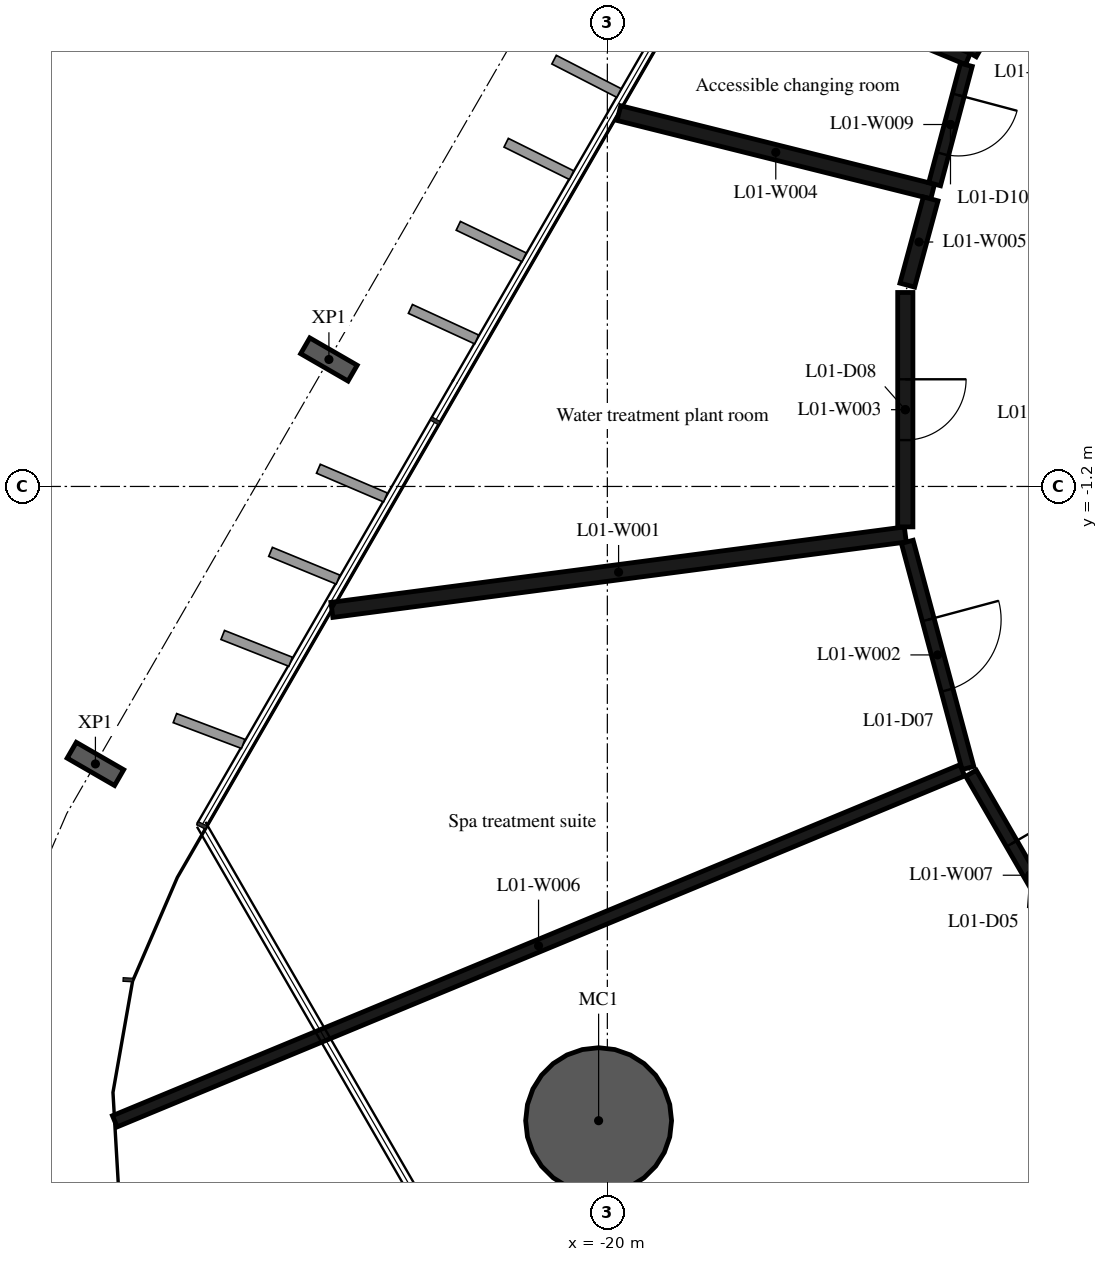
"""IFC4 building model, lengths in metres.
Left out: names, types, materials, properties, quantities, classifications, styles, units other than length and angle.
Written with IfcOpenShell. Run it as: python <this file> out.ifc"""

import sys

from ifc_helpers import new_model, si_unit, direction, frame, frame_2d, origin, origin_2d, place, context, subcontext, project, spatial, rectangle, hollow_circle, i_section, extrude, element, fill, save


model = new_model("IFC4")
c1 = context("Model", 3, precision=1e-05, world=origin(), true_north=direction((0.0, 1.0)))
c2 = subcontext(c1, "Body", "Model", "MODEL_VIEW")
j1 = project(units=[si_unit("LENGTHUNIT", "METRE"), si_unit("PLANEANGLEUNIT", "RADIAN")], contexts=[c1])
p1 = place(None, origin())
s1 = spatial("IfcSite", under=j1, at=p1, CompositionType="ELEMENT")
p2 = place(p1, origin())
s2 = spatial("IfcBuilding", under=s1, at=p2, CompositionType="ELEMENT")
p3 = place(p2, frame((0.0, 0.0, 9.0)))
s3 = spatial("IfcBuildingStorey", under=s2, at=p3, CompositionType="ELEMENT", Elevation=9.0)
p4 = place(p3, frame((-20.144, -11.63, -0.38), z_axis=(0.0, 0.0, 1.0), x_axis=(1.0, 0.0, 0.0)))
e1 = element("IfcColumn", 1, at=p4, inside=s3, PredefinedType="COLUMN", context=c2, shape_type="SweptSolid", body=[
    extrude(hollow_circle(Radius=1.2, WallThickness=0.06, at=origin_2d()), origin(), (0.0, 0.0, 1.0), 4.8),
])
for number, where, z_axis, x_axis in (
    (2, (-24.579, 0.888, -0.38), (0.0, 0.0, 1.0), (0.5, 0.866, 0.0)),
    (3, (-28.419, -5.763, -0.38), (0.0, 0.0, 1.0), (0.5, 0.866, 0.0)),
):
    element("IfcColumn", number, at=place(p3, frame(where, z_axis=z_axis, x_axis=x_axis)), inside=s3, PredefinedType="COLUMN", context=c2, shape_type="SweptSolid", body=[
        extrude(i_section(OverallWidth=0.3, OverallDepth=0.9, WebThickness=0.019, FlangeThickness=0.035, FilletRadius=0.03, at=origin_2d()), origin(), (0.0, 0.0, 1.0), 4.8),
    ])
p5 = place(p3, frame((-15.1, -1.99, 0.0), z_axis=(0.0, 0.0, 1.0), x_axis=(-0.99146503856, -0.130372839634, 0.0)))
e4 = element("IfcWall", 4, at=p5, inside=s3, PredefinedType="PARTITIONING", context=c2, shape_type="SweptSolid", body=[
    extrude(rectangle(XDim=9.511, YDim=0.25, at=frame_2d((4.756, 0.0))), origin(), (0.0, 0.0, 1.0), 4.42),
])
p6 = place(p3, frame((-15.068, -2.111, 0.0), z_axis=(0.0, 0.0, 1.0), x_axis=(0.259059323171, -0.965861411942, 0.0)))
e5 = element("IfcWall", 5, at=p6, inside=s3, PredefinedType="PARTITIONING", context=c2, shape_type="SweptSolid", body=[
    extrude(rectangle(XDim=3.851, YDim=0.2, at=frame_2d((1.925, 0.0))), origin(), (0.0, 0.0, 1.0), 4.42),
])
p7 = place(p6, frame((1.325, 0.0, 0.0)))
e6 = element("IfcOpeningElement", 6, at=p7, cuts=e5, PredefinedType="OPENING", context=c2, shape_type="SweptSolid", body=[
    extrude(rectangle(XDim=1.2, YDim=2.1, at=frame_2d((0.6, 1.05))), frame((0.0, 0.11, 0.0), z_axis=(0.0, -1.0, 0.0), x_axis=(1.0, 0.0, 0.0)), (0.0, 0.0, 1.0), 0.22),
])
p8 = place(p3, frame((-15.1, 1.99, 0.0), z_axis=(0.0, 0.0, 1.0), x_axis=(0.0, -1.0, 0.0)))
e7 = element("IfcWall", 7, at=p8, inside=s3, PredefinedType="PARTITIONING", context=c2, shape_type="SweptSolid", body=[
    extrude(rectangle(XDim=3.855, YDim=0.25, at=frame_2d((1.927, 0.0))), origin(), (0.0, 0.0, 1.0), 4.42),
])
p9 = place(p8, frame((1.427, 0.0, 0.0)))
e8 = element("IfcOpeningElement", 8, at=p9, cuts=e7, PredefinedType="OPENING", context=c2, shape_type="SweptSolid", body=[
    extrude(rectangle(XDim=1.0, YDim=2.1, at=frame_2d((0.5, 1.05))), frame((0.0, 0.135, 0.0), z_axis=(0.0, -1.0, 0.0), x_axis=(1.0, 0.0, 0.0)), (0.0, 0.0, 1.0), 0.27),
])
p10 = place(p3, frame((-14.65, 3.65, 0.0), z_axis=(0.0, 0.0, 1.0), x_axis=(-0.970142500145, 0.242535625036, 0.0)))
e9 = element("IfcWall", 9, at=p10, inside=s3, PredefinedType="PARTITIONING", context=c2, shape_type="SweptSolid", body=[
    extrude(rectangle(XDim=5.319, YDim=0.25, at=frame_2d((2.659, 0.0))), origin(), (0.0, 0.0, 1.0), 4.42),
])
p11 = place(p3, frame((-14.683, 3.529, 0.0), z_axis=(0.0, 0.0, 1.0), x_axis=(-0.261753947787, -0.9651346387, 0.0)))
e10 = element("IfcWall", 10, at=p11, inside=s3, PredefinedType="PARTITIONING", context=c2, shape_type="SweptSolid", body=[
    extrude(rectangle(XDim=1.47, YDim=0.25, at=frame_2d((0.735, 0.0))), origin(), (0.0, 0.0, 1.0), 4.42),
])
p12 = place(p3, frame((-14.162, -5.868, 0.0), z_axis=(0.0, 0.0, 1.0), x_axis=(-0.923914077449, -0.382600022859, 0.0)))
e11 = element("IfcWall", 11, at=p12, inside=s3, PredefinedType="PARTITIONING", context=c2, shape_type="SweptSolid", body=[
    extrude(rectangle(XDim=15.085, YDim=0.2, at=frame_2d((7.543, 0.0))), origin(), (0.0, 0.0, 1.0), 4.42),
])
p13 = place(p3, frame((-14.02, -5.917, 0.0), z_axis=(0.0, 0.0, 1.0), x_axis=(0.500733182901, -0.865601686425, 0.0)))
e12 = element("IfcWall", 12, at=p13, inside=s3, PredefinedType="PARTITIONING", context=c2, shape_type="SweptSolid", body=[
    extrude(rectangle(XDim=3.874, YDim=0.2, at=frame_2d((1.937, 0.0))), origin(), (0.0, 0.0, 1.0), 4.42),
])
p14 = place(p13, frame((1.337, 0.0, 0.0)))
e13 = element("IfcOpeningElement", 13, at=p14, cuts=e12, PredefinedType="OPENING", context=c2, shape_type="SweptSolid", body=[
    extrude(rectangle(XDim=1.2, YDim=2.1, at=frame_2d((0.6, 1.05))), frame((0.0, 0.11, 0.0), z_axis=(0.0, -1.0, 0.0), x_axis=(1.0, 0.0, 0.0)), (0.0, 0.0, 1.0), 0.22),
])
p15 = place(p3, frame((-14.07, 5.83, 0.0), z_axis=(0.0, 0.0, 1.0), x_axis=(-0.923722282312, 0.383062847533, 0.0)))
e14 = element("IfcWall", 14, at=p15, inside=s3, PredefinedType="PARTITIONING", context=c2, shape_type="SweptSolid", body=[
    extrude(rectangle(XDim=4.568, YDim=0.2, at=frame_2d((2.284, 0.0))), origin(), (0.0, 0.0, 1.0), 4.42),
])
p16 = place(p3, frame((-14.096, 5.733, 0.0), z_axis=(0.0, 0.0, 1.0), x_axis=(-0.257131388612, -0.96637645304, 0.0)))
e15 = element("IfcWall", 15, at=p16, inside=s3, PredefinedType="PARTITIONING", context=c2, shape_type="SweptSolid", body=[
    extrude(rectangle(XDim=2.031, YDim=0.2, at=frame_2d((1.016, 0.0))), origin(), (0.0, 0.0, 1.0), 4.42),
])
p17 = place(p16, frame((0.515, 0.0, 0.0)))
e16 = element("IfcOpeningElement", 16, at=p17, cuts=e15, PredefinedType="OPENING", context=c2, shape_type="SweptSolid", body=[
    extrude(rectangle(XDim=1.0, YDim=2.1, at=frame_2d((0.5, 1.05))), frame((0.0, 0.11, 0.0), z_axis=(0.0, -1.0, 0.0), x_axis=(1.0, 0.0, 0.0)), (0.0, 0.0, 1.0), 0.22),
])
p18 = place(p3, frame((-12.08, 9.27, 0.0), z_axis=(0.0, 0.0, 1.0), x_axis=(-0.500733182901, -0.865601686425, 0.0)))
e17 = element("IfcWall", 17, at=p18, inside=s3, PredefinedType="PARTITIONING", context=c2, shape_type="SweptSolid", body=[
    extrude(rectangle(XDim=3.874, YDim=0.2, at=frame_2d((1.937, 0.0))), origin(), (0.0, 0.0, 1.0), 4.42),
])
p19 = place(p18, frame((1.437, 0.0, 0.0)))
e18 = element("IfcOpeningElement", 18, at=p19, cuts=e17, PredefinedType="OPENING", context=c2, shape_type="SweptSolid", body=[
    extrude(rectangle(XDim=1.0, YDim=2.1, at=frame_2d((0.5, 1.05))), frame((0.0, 0.11, 0.0), z_axis=(0.0, -1.0, 0.0), x_axis=(1.0, 0.0, 0.0)), (0.0, 0.0, 1.0), 0.22),
])
p20 = place(p3, frame((-9.331, -12.159, 0.0), z_axis=(0.0, 0.0, 1.0), x_axis=(-0.608558385637, -0.793509099677, 0.0)))
e19 = element("IfcWall", 19, at=p20, inside=s3, PredefinedType="PARTITIONING", context=c2, shape_type="SweptSolid", body=[
    extrude(rectangle(XDim=9.415, YDim=0.2, at=frame_2d((4.707, 0.0))), origin(), (0.0, 0.0, 1.0), 4.42),
])
p21 = place(p14, origin())
e20 = element("IfcDoor", 20, at=p21, inside=s3, OperationType="SINGLE_SWING_LEFT", PredefinedType="DOOR", context=c2, shape_type="SweptSolid", body=[
    extrude(rectangle(XDim=1.2, YDim=2.1, at=frame_2d((0.6, 1.05))), frame((0.0, 0.025, 0.0), z_axis=(0.0, -1.0, 0.0), x_axis=(1.0, 0.0, 0.0)), (0.0, 0.0, 1.0), 0.05),
])
fill(e13, e20)
p22 = place(p7, origin())
e21 = element("IfcDoor", 21, at=p22, inside=s3, OperationType="SINGLE_SWING_LEFT", PredefinedType="DOOR", context=c2, shape_type="SweptSolid", body=[
    extrude(rectangle(XDim=1.2, YDim=2.1, at=frame_2d((0.6, 1.05))), frame((0.0, 0.025, 0.0), z_axis=(0.0, -1.0, 0.0), x_axis=(1.0, 0.0, 0.0)), (0.0, 0.0, 1.0), 0.05),
])
fill(e6, e21)
p23 = place(p9, origin())
e22 = element("IfcDoor", 22, at=p23, inside=s3, OperationType="SINGLE_SWING_LEFT", PredefinedType="DOOR", context=c2, shape_type="SweptSolid", body=[
    extrude(rectangle(XDim=1.0, YDim=2.1, at=frame_2d((0.5, 1.05))), frame((0.0, 0.025, 0.0), z_axis=(0.0, -1.0, 0.0), x_axis=(1.0, 0.0, 0.0)), (0.0, 0.0, 1.0), 0.05),
])
fill(e8, e22)
p24 = place(p17, origin())
e23 = element("IfcDoor", 23, at=p24, inside=s3, OperationType="SINGLE_SWING_LEFT", PredefinedType="DOOR", context=c2, shape_type="SweptSolid", body=[
    extrude(rectangle(XDim=1.0, YDim=2.1, at=frame_2d((0.5, 1.05))), frame((0.0, 0.025, 0.0), z_axis=(0.0, -1.0, 0.0), x_axis=(1.0, 0.0, 0.0)), (0.0, 0.0, 1.0), 0.05),
])
fill(e16, e23)
save(model, sys.argv[1])
